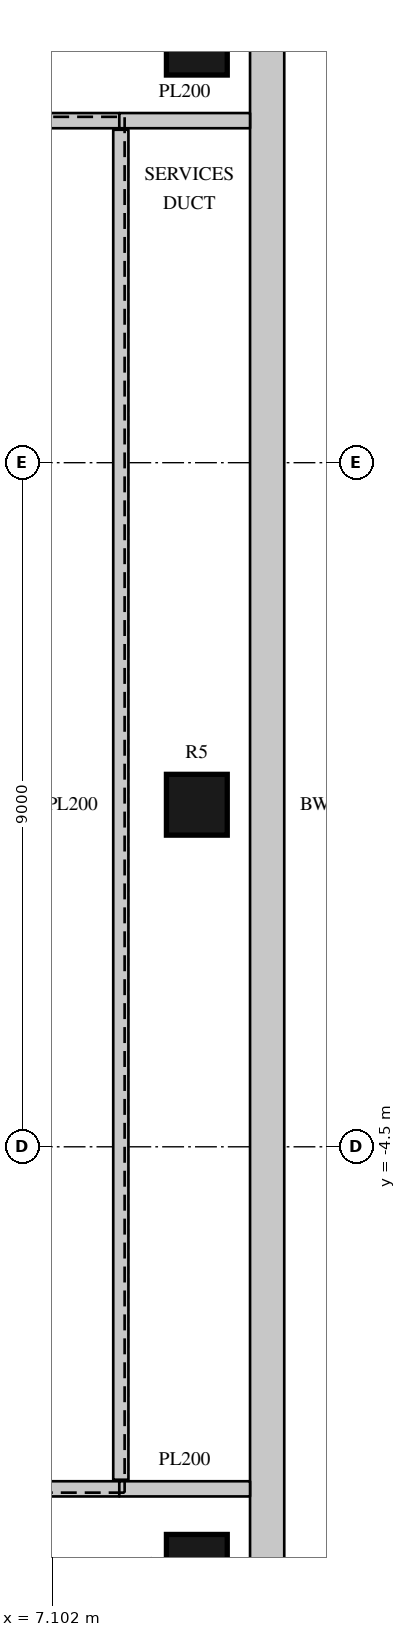
"""IFC4 building model, lengths in metres.
Left out: names, types, materials, properties, quantities, classifications, styles, units other than length and angle.
Written with IfcOpenShell. Run it as: python <this file> out.ifc"""

import sys

from ifc_helpers import new_model, si_unit, direction, frame, frame_2d, origin, origin_2d, place, context, subcontext, project, spatial, rectangle, circle, extrude, element, save


model = new_model("IFC4")
c1 = context("Model", 3, precision=1e-05, world=origin(), true_north=direction((0.0, 1.0)))
c2 = subcontext(c1, "Body", "Model", "MODEL_VIEW")
j1 = project(units=[si_unit("LENGTHUNIT", "METRE"), si_unit("PLANEANGLEUNIT", "RADIAN")], contexts=[c1])
p1 = place(None, origin())
s1 = spatial("IfcSite", under=j1, at=p1, CompositionType="ELEMENT")
p2 = place(p1, origin())
s2 = spatial("IfcBuilding", under=s1, at=p2, CompositionType="ELEMENT")
p3 = place(p2, frame((0.0, 0.0, 339.0)))
s3 = spatial("IfcBuildingStorey", under=s2, at=p3, CompositionType="ELEMENT", Elevation=339.0)
for number, where, z_axis, x_axis in (
    (1, (9.0, -10.0, 0.0), (0.0, 0.0, 1.0), (1.0, 0.0, 0.0)),
    (2, (9.0, 0.0, 0.0), (0.0, 0.0, 1.0), (1.0, 0.0, 0.0)),
    (3, (9.0, 10.0, 0.0), (0.0, 0.0, 1.0), (1.0, 0.0, 0.0)),
):
    element("IfcColumn", number, at=place(p3, frame(where, z_axis=z_axis, x_axis=x_axis)), inside=s3, PredefinedType="COLUMN", context=c2, shape_type="SweptSolid", body=[
        extrude(circle(Radius=0.4, at=origin_2d()), origin(), (0.0, 0.0, 1.0), 4.0),
    ])
p4 = place(p3, frame((9.925, -11.25, 0.0), z_axis=(0.0, 0.0, 1.0), x_axis=(0.0, 1.0, 0.0)))
e4 = element("IfcWall", 4, at=p4, inside=s3, PredefinedType="SOLIDWALL", context=c2, shape_type="SweptSolid", body=[
    extrude(rectangle(XDim=22.489, YDim=0.45, at=frame_2d((11.245, 0.0))), origin(), (0.0, 0.0, 1.0), 3.7),
])
for number, where, z_axis, x_axis in (
    (5, (-5.98, -9.0, 0.0), (0.0, 0.0, 1.0), (1.0, 0.0, 0.0)),
    (6, (-5.98, 9.0, 0.0), (0.0, 0.0, 1.0), (1.0, 0.0, 0.0)),
):
    element("IfcWall", number, at=place(p3, frame(where, z_axis=z_axis, x_axis=x_axis)), inside=s3, PredefinedType="PARTITIONING", context=c2, shape_type="SweptSolid", body=[
        extrude(rectangle(XDim=13.96, YDim=0.2, at=frame_2d((6.98, 0.0))), origin(), (0.0, 0.0, 1.0), 3.598),
    ])
for number, where, z_axis, x_axis in (
    (7, (7.98, -9.0, 0.0), (0.0, 0.0, 1.0), (1.0, 0.0, 0.0)),
    (8, (7.98, 9.0, 0.0), (0.0, 0.0, 1.0), (1.0, 0.0, 0.0)),
):
    element("IfcWall", number, at=place(p3, frame(where, z_axis=z_axis, x_axis=x_axis)), inside=s3, PredefinedType="PARTITIONING", context=c2, shape_type="SweptSolid", body=[
        extrude(rectangle(XDim=1.72, YDim=0.2, at=frame_2d((0.86, 0.0))), origin(), (0.0, 0.0, 1.0), 3.598),
    ])
p5 = place(p3, frame((8.0, -8.88, 0.0), z_axis=(0.0, 0.0, 1.0), x_axis=(0.0, 1.0, 0.0)))
e9 = element("IfcWall", 9, at=p5, inside=s3, PredefinedType="PARTITIONING", context=c2, shape_type="SweptSolid", body=[
    extrude(rectangle(XDim=17.76, YDim=0.2, at=frame_2d((8.88, 0.0))), origin(), (0.0, 0.0, 1.0), 3.598),
])
save(model, sys.argv[1])
